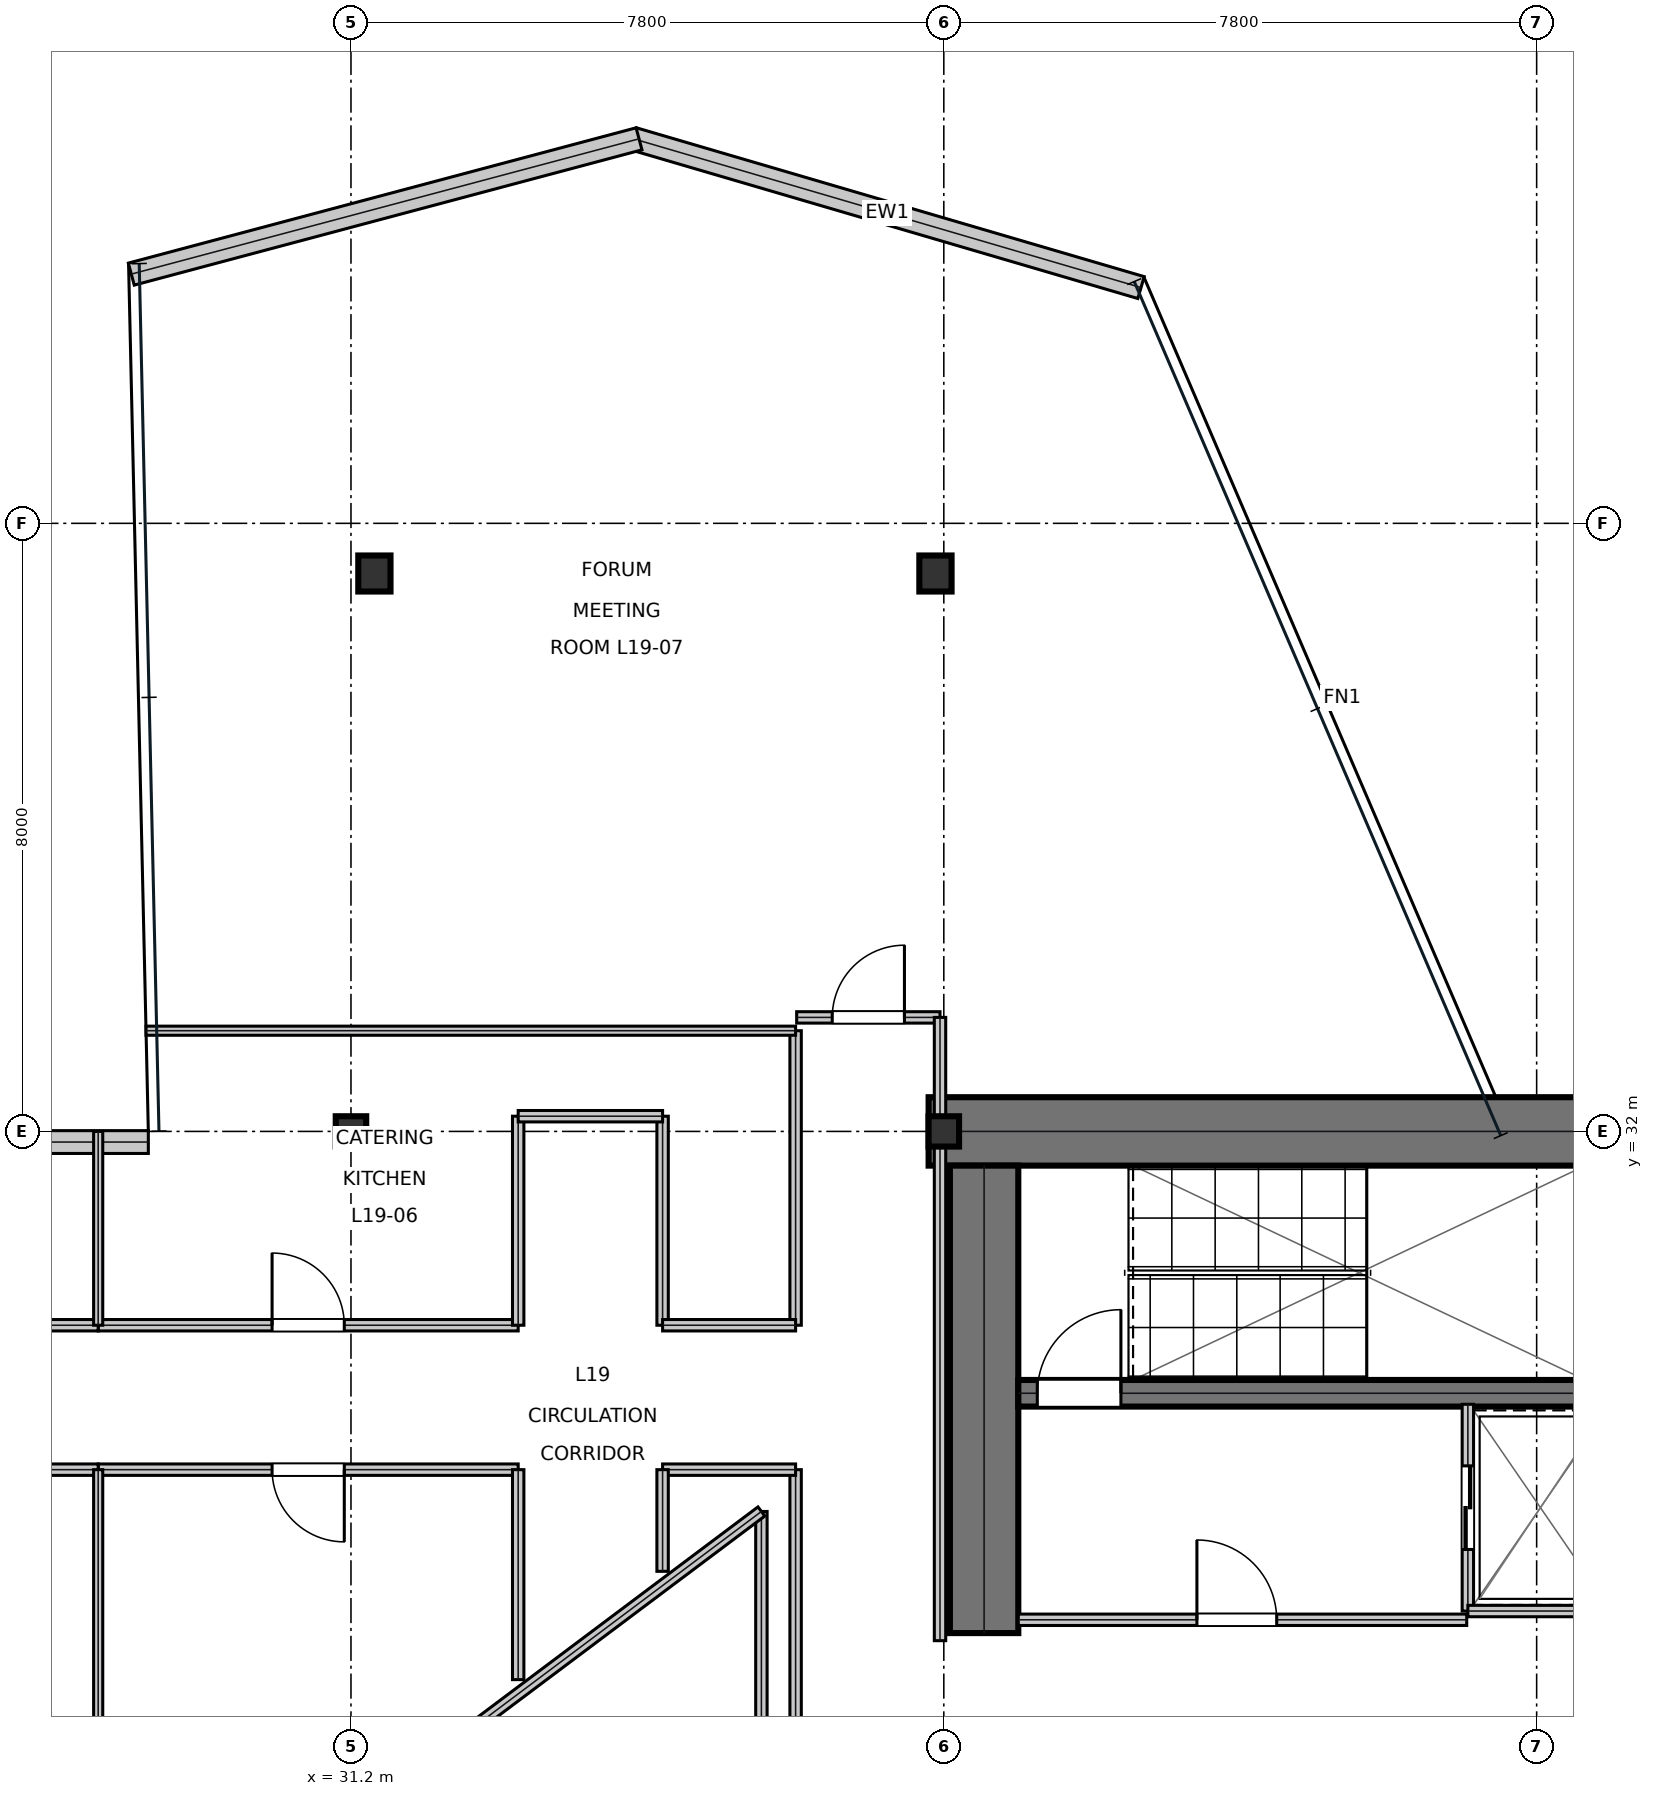
"""IFC4 building model, lengths in metres.
Left out: names, types, materials, properties, quantities, classifications, styles, units other than length and angle.
Written with IfcOpenShell. Run it as: python <this file> out.ifc"""

import sys

from ifc_helpers import new_model, si_unit, direction, frame, frame_2d, origin, origin_2d, place, context, subcontext, project, spatial, rectangle, i_section, extrude, element, fill, save


model = new_model("IFC4")
c1 = context("Model", 3, precision=1e-05, world=origin(), true_north=direction((0.0, 1.0)))
c2 = subcontext(c1, "Body", "Model", "MODEL_VIEW")
j1 = project(units=[si_unit("LENGTHUNIT", "METRE"), si_unit("PLANEANGLEUNIT", "RADIAN")], contexts=[c1])
p1 = place(None, origin())
s1 = spatial("IfcSite", under=j1, at=p1, CompositionType="ELEMENT")
p2 = place(p1, origin())
s2 = spatial("IfcBuilding", under=s1, at=p2, CompositionType="ELEMENT")
p3 = place(p2, frame((0.0, 0.0, 86.4)))
s3 = spatial("IfcBuildingStorey", under=s2, at=p3, CompositionType="ELEMENT", Elevation=86.4)
p4 = place(p3, frame((38.8, 32.0, 0.0), z_axis=(0.0, 0.0, 1.0), x_axis=(1.0, 0.0, 0.0)))
e1 = element("IfcWall", 1, at=p4, inside=s3, PredefinedType="SHEAR", context=c2, shape_type="SweptSolid", body=[
    extrude(rectangle(XDim=16.0, YDim=0.9, at=frame_2d((8.0, 0.0))), origin(), (0.0, 0.0, 1.0), 3.81),
])
p5 = place(p3, frame((39.53, 25.4, 0.0), z_axis=(0.0, 0.0, 1.0), x_axis=(0.0, 1.0, 0.0)))
e2 = element("IfcWall", 2, at=p5, inside=s3, PredefinedType="SHEAR", context=c2, shape_type="SweptSolid", body=[
    extrude(rectangle(XDim=6.15, YDim=0.9, at=frame_2d((3.075, 0.0))), origin(), (0.0, 0.0, 1.0), 3.81),
])
p6 = place(p3, frame((39.98, 28.555, 0.0), z_axis=(0.0, 0.0, 1.0), x_axis=(1.0, 0.0, 0.0)))
e3 = element("IfcWall", 3, at=p6, inside=s3, PredefinedType="SHEAR", context=c2, shape_type="SweptSolid", body=[
    extrude(rectangle(XDim=7.71, YDim=0.35, at=frame_2d((3.855, 0.0))), origin(), (0.0, 0.0, 1.0), 3.81),
])
p7 = place(p6, frame((0.25, 0.0, 0.0)))
e4 = element("IfcOpeningElement", 4, at=p7, cuts=e3, PredefinedType="OPENING", context=c2, shape_type="SweptSolid", body=[
    extrude(rectangle(XDim=1.1, YDim=2.15, at=frame_2d((0.55, 1.075))), frame((0.0, 0.185, 0.0), z_axis=(0.0, -1.0, 0.0), x_axis=(1.0, 0.0, 0.0)), (0.0, 0.0, 1.0), 0.37),
])
for number, where, z_axis, x_axis in (
    (5, (31.2, 32.0, 0.0), (0.0, 0.0, 1.0), (1.0, 0.0, 0.0)),
    (6, (39.0, 32.0, 0.0), (0.0, 0.0, 1.0), (1.0, 0.0, 0.0)),
):
    element("IfcColumn", number, at=place(p3, frame(where, z_axis=z_axis, x_axis=x_axis)), inside=s3, PredefinedType="COLUMN", context=c2, shape_type="SweptSolid", body=[
        extrude(i_section(OverallWidth=0.401, OverallDepth=0.399, WebThickness=0.025, FlangeThickness=0.04, at=origin_2d()), origin(), (0.0, 0.0, 1.0), 4.044),
    ])
p8 = place(p3, frame((31.508, 39.34, 0.016), z_axis=(0.003463243796, -0.00747331556, 0.999966077173), x_axis=(0.907310606534, 0.420461012784, 0.0)))
e7 = element("IfcColumn", 7, at=p8, inside=s3, PredefinedType="COLUMN", context=c2, shape_type="SweptSolid", body=[
    extrude(i_section(OverallWidth=0.424, OverallDepth=0.474, WebThickness=0.048, FlangeThickness=0.077, at=origin_2d()), origin(), (0.0, 0.0, 1.0), 4.018),
])
p9 = place(p3, frame((38.89, 39.34, 0.016), z_axis=(-0.001215179652, -0.007473354861, 0.999971335742), x_axis=(0.987036848987, -0.160493796583, 0.0)))
e8 = element("IfcColumn", 8, at=p9, inside=s3, PredefinedType="COLUMN", context=c2, shape_type="SweptSolid", body=[
    extrude(i_section(OverallWidth=0.424, OverallDepth=0.474, WebThickness=0.048, FlangeThickness=0.077, at=origin_2d()), origin(), (0.0, 0.0, 1.0), 4.018),
])
p10 = place(p3, frame((41.595, 43.102, 0.0), z_axis=(0.0, 0.0, 1.0), x_axis=(-0.959627564603, 0.281273776336, 0.0)))
e9 = element("IfcWall", 9, at=p10, inside=s3, PredefinedType="STANDARD", context=c2, shape_type="SweptSolid", body=[
    extrude(rectangle(XDim=6.961, YDim=0.3, at=frame_2d((3.48, 0.0))), origin(), (0.0, 0.0, 1.0), 3.81),
])
p11 = place(p3, frame((34.99, 45.059, 0.0), z_axis=(0.0, 0.0, 1.0), x_axis=(-0.966292357614, -0.257447236569, 0.0)))
e10 = element("IfcWall", 10, at=p11, inside=s3, PredefinedType="STANDARD", context=c2, shape_type="SweptSolid", body=[
    extrude(rectangle(XDim=6.913, YDim=0.3, at=frame_2d((3.457, 0.0))), origin(), (0.0, 0.0, 1.0), 3.81),
])
p12 = place(p3, frame((28.534, 31.86, 0.0), z_axis=(0.0, 0.0, 1.0), x_axis=(-1.0, 0.0, 0.0)))
e11 = element("IfcWall", 11, at=p12, inside=s3, PredefinedType="STANDARD", context=c2, shape_type="SweptSolid", body=[
    extrude(rectangle(XDim=2.782, YDim=0.3, at=frame_2d((1.391, 0.0))), origin(), (0.0, 0.0, 1.0), 3.81),
])
p13 = place(p3, frame((39.98, 25.575, 0.0), z_axis=(0.0, 0.0, 1.0), x_axis=(1.0, 0.0, 0.0)))
e12 = element("IfcWall", 12, at=p13, inside=s3, PredefinedType="PARTITIONING", context=c2, shape_type="SweptSolid", body=[
    extrude(rectangle(XDim=5.9, YDim=0.15, at=frame_2d((2.95, 0.0))), origin(), (0.0, 0.0, 1.0), 3.81),
])
p14 = place(p13, frame((2.35, 0.0, 0.0)))
e13 = element("IfcOpeningElement", 13, at=p14, cuts=e12, PredefinedType="OPENING", context=c2, shape_type="SweptSolid", body=[
    extrude(rectangle(XDim=1.05, YDim=2.15, at=frame_2d((0.525, 1.075))), frame((0.0, 0.085, 0.0), z_axis=(0.0, -1.0, 0.0), x_axis=(1.0, 0.0, 0.0)), (0.0, 0.0, 1.0), 0.17),
])
p15 = place(p3, frame((45.895, 25.69, 0.0), z_axis=(0.0, 0.0, 1.0), x_axis=(0.0, 1.0, 0.0)))
e14 = element("IfcWall", 14, at=p15, inside=s3, PredefinedType="PARTITIONING", context=c2, shape_type="SweptSolid", body=[
    extrude(rectangle(XDim=2.72, YDim=0.15, at=frame_2d((1.36, 0.0))), origin(), (0.0, 0.0, 1.0), 3.81),
])
p16 = place(p15, frame((0.81, 0.0, 0.0)))
e15 = element("IfcOpeningElement", 15, at=p16, cuts=e14, PredefinedType="OPENING", context=c2, shape_type="SweptSolid", body=[
    extrude(rectangle(XDim=1.1, YDim=2.15, at=frame_2d((0.55, 1.075))), frame((0.0, 0.085, 0.0), z_axis=(0.0, -1.0, 0.0), x_axis=(1.0, 0.0, 0.0)), (0.0, 0.0, 1.0), 0.17),
])
p17 = place(p3, frame((45.895, 25.69, 0.0), z_axis=(0.0, 0.0, 1.0), x_axis=(1.0, 0.0, 0.0)))
e16 = element("IfcWall", 16, at=p17, inside=s3, PredefinedType="PARTITIONING", context=c2, shape_type="SweptSolid", body=[
    extrude(rectangle(XDim=1.915, YDim=0.15, at=frame_2d((0.958, 0.0))), origin(), (0.0, 0.0, 1.0), 3.81),
])
p18 = place(p3, frame((37.05, 14.675, 0.0), z_axis=(0.0, 0.0, 1.0), x_axis=(0.0, 1.0, 0.0)))
e17 = element("IfcWall", 17, at=p18, inside=s3, PredefinedType="PARTITIONING", context=c2, shape_type="SweptSolid", body=[
    extrude(rectangle(XDim=12.875, YDim=0.15, at=frame_2d((6.438, 0.0))), origin(), (0.0, 0.0, 1.0), 3.181),
])
p19 = place(p18, frame((4.343, 0.0, 0.0)))
e18 = element("IfcOpeningElement", 18, at=p19, cuts=e17, PredefinedType="OPENING", context=c2, shape_type="SweptSolid", body=[
    extrude(rectangle(XDim=0.95, YDim=2.15, at=frame_2d((0.475, 1.075))), frame((0.0, 0.085, 0.0), z_axis=(0.0, -1.0, 0.0), x_axis=(1.0, 0.0, 0.0)), (0.0, 0.0, 1.0), 0.17),
])
p20 = place(p3, frame((27.874, 27.55, 0.0), z_axis=(0.0, 0.0, 1.0), x_axis=(1.0, 0.0, 0.0)))
e19 = element("IfcWall", 19, at=p20, inside=s3, PredefinedType="PARTITIONING", context=c2, shape_type="SweptSolid", body=[
    extrude(rectangle(XDim=5.526, YDim=0.15, at=frame_2d((2.763, 0.0))), origin(), (0.0, 0.0, 1.0), 3.181),
])
p21 = place(p20, frame((2.288, 0.0, 0.0)))
e20 = element("IfcOpeningElement", 20, at=p21, cuts=e19, PredefinedType="OPENING", context=c2, shape_type="SweptSolid", body=[
    extrude(rectangle(XDim=0.95, YDim=2.15, at=frame_2d((0.475, 1.075))), frame((0.0, 0.085, 0.0), z_axis=(0.0, -1.0, 0.0), x_axis=(1.0, 0.0, 0.0)), (0.0, 0.0, 1.0), 0.17),
])
p22 = place(p3, frame((27.874, 29.45, 0.0), z_axis=(0.0, 0.0, 1.0), x_axis=(1.0, 0.0, 0.0)))
e21 = element("IfcWall", 21, at=p22, inside=s3, PredefinedType="PARTITIONING", context=c2, shape_type="SweptSolid", body=[
    extrude(rectangle(XDim=5.526, YDim=0.15, at=frame_2d((2.763, 0.0))), origin(), (0.0, 0.0, 1.0), 3.181),
])
p23 = place(p22, frame((2.288, 0.0, 0.0)))
e22 = element("IfcOpeningElement", 22, at=p23, cuts=e21, PredefinedType="OPENING", context=c2, shape_type="SweptSolid", body=[
    extrude(rectangle(XDim=0.95, YDim=2.15, at=frame_2d((0.475, 1.075))), frame((0.0, 0.085, 0.0), z_axis=(0.0, -1.0, 0.0), x_axis=(1.0, 0.0, 0.0)), (0.0, 0.0, 1.0), 0.17),
])
p24 = place(p3, frame((37.064, 33.5, 0.0), z_axis=(0.0, 0.0, 1.0), x_axis=(1.0, 0.0, 0.0)))
e23 = element("IfcWall", 23, at=p24, inside=s3, PredefinedType="PARTITIONING", context=c2, shape_type="SweptSolid", body=[
    extrude(rectangle(XDim=1.886, YDim=0.15, at=frame_2d((0.943, 0.0))), origin(), (0.0, 0.0, 1.0), 3.181),
])
p25 = place(p24, frame((0.468, 0.0, 0.0)))
e24 = element("IfcOpeningElement", 24, at=p25, cuts=e23, PredefinedType="OPENING", context=c2, shape_type="SweptSolid", body=[
    extrude(rectangle(XDim=0.95, YDim=2.15, at=frame_2d((0.475, 1.075))), frame((0.0, 0.085, 0.0), z_axis=(0.0, -1.0, 0.0), x_axis=(1.0, 0.0, 0.0)), (0.0, 0.0, 1.0), 0.17),
])
p26 = place(p3, frame((35.3, 27.55, 0.0), z_axis=(0.0, 0.0, 1.0), x_axis=(1.0, 0.0, 0.0)))
e25 = element("IfcWall", 25, at=p26, inside=s3, PredefinedType="PARTITIONING", context=c2, shape_type="SweptSolid", body=[
    extrude(rectangle(XDim=1.75, YDim=0.15, at=frame_2d((0.875, 0.0))), origin(), (0.0, 0.0, 1.0), 3.391),
])
p27 = place(p3, frame((35.3, 26.212, 0.0), z_axis=(0.0, 0.0, 1.0), x_axis=(0.0, 1.0, 0.0)))
e26 = element("IfcWall", 26, at=p27, inside=s3, PredefinedType="PARTITIONING", context=c2, shape_type="SweptSolid", body=[
    extrude(rectangle(XDim=1.338, YDim=0.15, at=frame_2d((0.669, 0.0))), origin(), (0.0, 0.0, 1.0), 3.81),
])
p28 = place(p3, frame((15.674, 29.45, 0.0), z_axis=(0.0, 0.0, 1.0), x_axis=(1.0, 0.0, 0.0)))
e27 = element("IfcWall", 27, at=p28, inside=s3, PredefinedType="PARTITIONING", context=c2, shape_type="SweptSolid", body=[
    extrude(rectangle(XDim=12.2, YDim=0.15, at=frame_2d((6.1, 0.0))), origin(), (0.0, 0.0, 1.0), 3.338),
])
p29 = place(p3, frame((21.4, 27.55, 0.0), z_axis=(0.0, 0.0, 1.0), x_axis=(1.0, 0.0, 0.0)))
e28 = element("IfcWall", 28, at=p29, inside=s3, PredefinedType="PARTITIONING", context=c2, shape_type="SweptSolid", body=[
    extrude(rectangle(XDim=6.474, YDim=0.15, at=frame_2d((3.237, 0.0))), origin(), (0.0, 0.0, 1.0), 3.391),
])
p30 = place(p3, frame((33.4, 24.788, 0.0), z_axis=(0.0, 0.0, 1.0), x_axis=(0.0, 1.0, 0.0)))
e29 = element("IfcWall", 29, at=p30, inside=s3, PredefinedType="PARTITIONING", context=c2, shape_type="SweptSolid", body=[
    extrude(rectangle(XDim=2.762, YDim=0.15, at=frame_2d((1.381, 0.0))), origin(), (0.0, 0.0, 1.0), 3.81),
])
p31 = place(p3, frame((37.05, 29.45, 0.0), z_axis=(0.0, 0.0, 1.0), x_axis=(0.0, 1.0, 0.0)))
e30 = element("IfcWall", 30, at=p31, inside=s3, PredefinedType="PARTITIONING", context=c2, shape_type="SweptSolid", body=[
    extrude(rectangle(XDim=3.875, YDim=0.15, at=frame_2d((1.938, 0.0))), origin(), (0.0, 0.0, 1.0), 3.181),
])
for number, where, z_axis, x_axis in (
    (31, (33.4, 29.45, 0.0), (0.0, 0.0, 1.0), (0.0, 1.0, 0.0)),
    (32, (35.3, 29.45, 0.0), (0.0, 0.0, 1.0), (0.0, 1.0, 0.0)),
):
    element("IfcWall", number, at=place(p3, frame(where, z_axis=z_axis, x_axis=x_axis)), inside=s3, PredefinedType="PARTITIONING", context=c2, shape_type="SweptSolid", body=[
        extrude(rectangle(XDim=2.75, YDim=0.15, at=frame_2d((1.375, 0.0))), origin(), (0.0, 0.0, 1.0), 3.181),
    ])
p32 = place(p3, frame((33.4, 32.2, 0.0), z_axis=(0.0, 0.0, 1.0), x_axis=(1.0, 0.0, 0.0)))
e33 = element("IfcWall", 33, at=p32, inside=s3, PredefinedType="PARTITIONING", context=c2, shape_type="SweptSolid", body=[
    extrude(rectangle(XDim=1.9, YDim=0.15, at=frame_2d((0.95, 0.0))), origin(), (0.0, 0.0, 1.0), 3.181),
])
p33 = place(p3, frame((35.3, 29.45, 0.0), z_axis=(0.0, 0.0, 1.0), x_axis=(1.0, 0.0, 0.0)))
e34 = element("IfcWall", 34, at=p33, inside=s3, PredefinedType="PARTITIONING", context=c2, shape_type="SweptSolid", body=[
    extrude(rectangle(XDim=1.75, YDim=0.15, at=frame_2d((0.875, 0.0))), origin(), (0.0, 0.0, 1.0), 3.81),
])
p34 = place(p3, frame((38.95, 25.3, 0.0), z_axis=(0.0, 0.0, 1.0), x_axis=(0.0, 1.0, 0.0)))
e35 = element("IfcWall", 35, at=p34, inside=s3, PredefinedType="PARTITIONING", context=c2, shape_type="SweptSolid", body=[
    extrude(rectangle(XDim=8.2, YDim=0.15, at=frame_2d((4.1, 0.0))), origin(), (0.0, 0.0, 1.0), 3.181),
])
p35 = place(p3, frame((27.874, 29.45, 0.0), z_axis=(0.0, 0.0, 1.0), x_axis=(0.0, 1.0, 0.0)))
e36 = element("IfcWall", 36, at=p35, inside=s3, PredefinedType="PARTITIONING", context=c2, shape_type="SweptSolid", body=[
    extrude(rectangle(XDim=2.55, YDim=0.12, at=frame_2d((1.275, 0.0))), origin(), (0.0, 0.0, 1.0), 3.338),
])
p36 = place(p3, frame((27.874, 20.45, 0.0), z_axis=(0.0, 0.0, 1.0), x_axis=(0.0, 1.0, 0.0)))
e37 = element("IfcWall", 37, at=p36, inside=s3, PredefinedType="PARTITIONING", context=c2, shape_type="SweptSolid", body=[
    extrude(rectangle(XDim=7.1, YDim=0.12, at=frame_2d((3.55, 0.0))), origin(), (0.0, 0.0, 1.0), 3.181),
])
p37 = place(p3, frame((28.504, 33.325, 0.0), z_axis=(0.0, 0.0, 1.0), x_axis=(1.0, 0.0, 0.0)))
e38 = element("IfcWall", 38, at=p37, inside=s3, PredefinedType="PARTITIONING", context=c2, shape_type="SweptSolid", body=[
    extrude(rectangle(XDim=8.546, YDim=0.12, at=frame_2d((4.273, 0.0))), origin(), (0.0, 0.0, 1.0), 3.338),
])
p38 = place(p3, frame((36.6, 21.0, 0.0), z_axis=(0.0, 0.0, 1.0), x_axis=(0.0, 1.0, 0.0)))
e39 = element("IfcWall", 39, at=p38, inside=s3, PredefinedType="MOVABLE", context=c2, shape_type="SweptSolid", body=[
    extrude(rectangle(XDim=6.0, YDim=0.15, at=frame_2d((3.0, 0.0))), origin(), (0.0, 0.0, 1.0), 3.81),
])
p39 = place(p3, frame((36.6, 27.0, 0.0), z_axis=(0.0, 0.0, 1.0), x_axis=(-0.8, -0.6, 0.0)))
e40 = element("IfcWall", 40, at=p39, inside=s3, PredefinedType="MOVABLE", context=c2, shape_type="SweptSolid", body=[
    extrude(rectangle(XDim=5.0, YDim=0.15, at=frame_2d((2.5, 0.0))), origin(), (0.0, 0.0, 1.0), 3.81),
])
p40 = place(p14, origin())
e41 = element("IfcDoor", 41, at=p40, inside=s3, OperationType="SINGLE_SWING_LEFT", PredefinedType="DOOR", context=c2, shape_type="SweptSolid", body=[
    extrude(rectangle(XDim=1.05, YDim=2.15, at=frame_2d((0.525, 1.075))), frame((0.0, 0.025, 0.0), z_axis=(0.0, -1.0, 0.0), x_axis=(1.0, 0.0, 0.0)), (0.0, 0.0, 1.0), 0.05),
])
fill(e13, e41)
p41 = place(p16, frame((1.1, 0.0, 0.0), z_axis=(0.0, 0.0, 1.0), x_axis=(-1.0, 0.0, 0.0)))
e42 = element("IfcDoor", 42, at=p41, inside=s3, OperationType="DOUBLE_DOOR_SLIDING", PredefinedType="DOOR", context=c2, shape_type="SweptSolid", body=[
    extrude(rectangle(XDim=1.1, YDim=2.15, at=frame_2d((0.55, 1.075))), frame((0.0, 0.025, 0.0), z_axis=(0.0, -1.0, 0.0), x_axis=(1.0, 0.0, 0.0)), (0.0, 0.0, 1.0), 0.05),
])
fill(e15, e42)
p42 = place(p21, frame((0.95, 0.0, 0.0), z_axis=(0.0, 0.0, 1.0), x_axis=(-1.0, 0.0, 0.0)))
e43 = element("IfcDoor", 43, at=p42, inside=s3, OperationType="SINGLE_SWING_LEFT", PredefinedType="DOOR", context=c2, shape_type="SweptSolid", body=[
    extrude(rectangle(XDim=0.95, YDim=2.15, at=frame_2d((0.475, 1.075))), frame((0.0, 0.025, 0.0), z_axis=(0.0, -1.0, 0.0), x_axis=(1.0, 0.0, 0.0)), (0.0, 0.0, 1.0), 0.05),
])
fill(e20, e43)
p43 = place(p23, origin())
e44 = element("IfcDoor", 44, at=p43, inside=s3, OperationType="SINGLE_SWING_LEFT", PredefinedType="DOOR", context=c2, shape_type="SweptSolid", body=[
    extrude(rectangle(XDim=0.95, YDim=2.15, at=frame_2d((0.475, 1.075))), frame((0.0, 0.025, 0.0), z_axis=(0.0, -1.0, 0.0), x_axis=(1.0, 0.0, 0.0)), (0.0, 0.0, 1.0), 0.05),
])
fill(e22, e44)
p44 = place(p25, origin())
e45 = element("IfcDoor", 45, at=p44, inside=s3, OperationType="SINGLE_SWING_RIGHT", PredefinedType="DOOR", context=c2, shape_type="SweptSolid", body=[
    extrude(rectangle(XDim=0.95, YDim=2.15, at=frame_2d((0.475, 1.075))), frame((0.0, 0.025, 0.0), z_axis=(0.0, -1.0, 0.0), x_axis=(1.0, 0.0, 0.0)), (0.0, 0.0, 1.0), 0.05),
])
fill(e24, e45)
p45 = place(p7, origin())
e46 = element("IfcDoor", 46, at=p45, inside=s3, OperationType="SINGLE_SWING_RIGHT", PredefinedType="DOOR", context=c2, shape_type="SweptSolid", body=[
    extrude(rectangle(XDim=1.1, YDim=2.15, at=frame_2d((0.55, 1.075))), frame((0.0, 0.025, 0.0), z_axis=(0.0, -1.0, 0.0), x_axis=(1.0, 0.0, 0.0)), (0.0, 0.0, 1.0), 0.05),
])
fill(e4, e46)
save(model, sys.argv[1])
